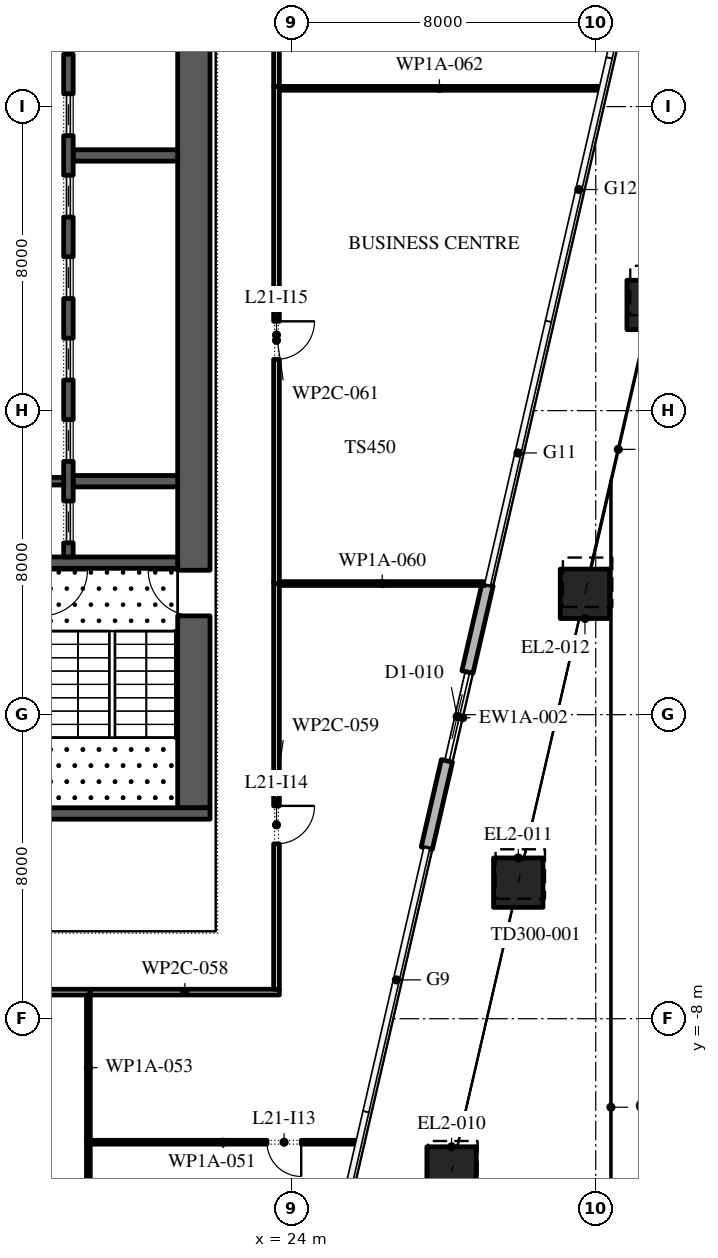
"""IFC4 building model, lengths in metres.
Left out: names, types, materials, properties, quantities, classifications, styles, units other than length and angle.
Written with IfcOpenShell. Run it as: python <this file> out.ifc"""

import sys

from ifc_helpers import new_model, si_unit, direction, frame, frame_2d, origin, origin_2d, place, context, subcontext, project, spatial, rectangle, extrude, element, fill, save


model = new_model("IFC4")
c1 = context("Model", 3, precision=1e-05, world=origin(), true_north=direction((0.0, 1.0)))
c2 = subcontext(c1, "Body", "Model", "MODEL_VIEW")
j1 = project(units=[si_unit("LENGTHUNIT", "METRE"), si_unit("PLANEANGLEUNIT", "RADIAN")], contexts=[c1])
p1 = place(None, origin())
s1 = spatial("IfcSite", under=j1, at=p1, CompositionType="ELEMENT")
p2 = place(p1, origin())
s2 = spatial("IfcBuilding", under=s1, at=p2, CompositionType="ELEMENT")
p3 = place(p2, frame((0.0, 0.0, 99.6)))
s3 = spatial("IfcBuildingStorey", under=s2, at=p3, CompositionType="ELEMENT", Elevation=99.6)
p4 = place(p3, frame((28.207, -12.02, 0.0), z_axis=(0.005857398783, 0.025300708632, 0.999662725634), x_axis=(-0.974232565058, 0.225545802843, 0.0)))
e1 = element("IfcColumn", 1, at=p4, inside=s3, PredefinedType="COLUMN", context=c2, shape_type="SweptSolid", body=[
    extrude(rectangle(XDim=1.3, YDim=1.3, at=origin_2d()), origin(), (0.0, 0.0, 1.0), 6.002),
])
p5 = place(p3, frame((29.961, -4.42, 0.0), z_axis=(0.008782396982, 0.037935075853, 0.999241612186), x_axis=(-0.974232565058, 0.225545802843, 0.0)))
e2 = element("IfcColumn", 2, at=p5, inside=s3, PredefinedType="COLUMN", context=c2, shape_type="SweptSolid", body=[
    extrude(rectangle(XDim=1.3, YDim=1.3, at=origin_2d()), origin(), (0.0, 0.0, 1.0), 6.005),
])
p6 = place(p3, frame((31.716, 3.18, 0.0), z_axis=(0.011662358406, 0.050509796164, 0.998655471065), x_axis=(-0.974364765994, 0.224974004698, 0.0)))
e3 = element("IfcColumn", 3, at=p6, inside=s3, PredefinedType="COLUMN", context=c2, shape_type="SweptSolid", body=[
    extrude(rectangle(XDim=1.3, YDim=1.3, at=origin_2d()), origin(), (0.0, 0.0, 1.0), 6.008),
])
p7 = place(p3, frame((33.471, 10.781, 0.0), z_axis=(0.014577044955, 0.063140125085, 0.997898208418), x_axis=(-0.974370069894, 0.224951032214, 0.0)))
e4 = element("IfcColumn", 4, at=p7, inside=s3, PredefinedType="COLUMN", context=c2, shape_type="SweptSolid", body=[
    extrude(rectangle(XDim=1.3, YDim=1.3, at=origin_2d()), origin(), (0.0, 0.0, 1.0), 6.013),
])
p8 = place(p3, frame((27.554, -3.512, 0.0), z_axis=(0.0, 0.0, 1.0), x_axis=(0.224949733175, 0.9743703698, 0.0)))
e5 = element("IfcWall", 5, at=p8, inside=s3, PredefinedType="STANDARD", context=c2, shape_type="SweptSolid", body=[
    extrude(rectangle(XDim=7.114, YDim=0.3, at=frame_2d((3.557, 0.0))), origin(), (0.0, 0.0, 1.0), 5.8),
])
p9 = place(p8, frame((2.357, 0.0, 0.0)))
e6 = element("IfcOpeningElement", 6, at=p9, cuts=e5, PredefinedType="OPENING", context=c2, shape_type="SweptSolid", body=[
    extrude(rectangle(XDim=2.4, YDim=3.5, at=frame_2d((1.2, 1.75))), frame((0.0, 0.16, 0.0), z_axis=(0.0, -1.0, 0.0), x_axis=(1.0, 0.0, 0.0)), (0.0, 0.0, 1.0), 0.32),
])
p10 = place(p3, frame((21.425, -2.45, 0.0), z_axis=(0.0, 0.0, 1.0), x_axis=(0.0, 1.0, 0.0)))
e7 = element("IfcWall", 7, at=p10, inside=s3, PredefinedType="SHEAR", context=c2, shape_type="SweptSolid", body=[
    extrude(rectangle(XDim=27.9, YDim=0.85, at=frame_2d((13.95, 0.0))), origin(), (0.0, 0.0, 1.0), 5.8),
])
p11 = place(p10, frame((5.05, 0.0, 0.0)))
e8 = element("IfcOpeningElement", 8, at=p11, cuts=e7, PredefinedType="OPENING", context=c2, shape_type="SweptSolid", body=[
    extrude(rectangle(XDim=1.2, YDim=2.1, at=frame_2d((0.6, 1.05))), frame((0.0, 0.435, 0.0), z_axis=(0.0, -1.0, 0.0), x_axis=(1.0, 0.0, 0.0)), (0.0, 0.0, 1.0), 0.87),
])
p12 = place(p10, frame((21.65, 0.0, 0.0)))
e9 = element("IfcOpeningElement", 9, at=p12, cuts=e7, PredefinedType="OPENING", context=c2, shape_type="SweptSolid", body=[
    extrude(rectangle(XDim=1.2, YDim=2.1, at=frame_2d((0.6, 1.05))), frame((0.0, 0.435, 0.0), z_axis=(0.0, -1.0, 0.0), x_axis=(1.0, 0.0, 0.0)), (0.0, 0.0, 1.0), 0.87),
])
p13 = place(p3, frame((10.15, -2.6, 0.0), z_axis=(0.0, 0.0, 1.0), x_axis=(1.0, 0.0, 0.0)))
e10 = element("IfcWall", 10, at=p13, inside=s3, PredefinedType="SHEAR", context=c2, shape_type="SweptSolid", body=[
    extrude(rectangle(XDim=11.7, YDim=0.3, at=frame_2d((5.85, 0.0))), origin(), (0.0, 0.0, 1.0), 5.8),
])
p14 = place(p3, frame((17.3, 4.0, 0.0), z_axis=(0.0, 0.0, 1.0), x_axis=(1.0, 0.0, 0.0)))
e11 = element("IfcWall", 11, at=p14, inside=s3, PredefinedType="SHEAR", context=c2, shape_type="SweptSolid", body=[
    extrude(rectangle(XDim=3.7, YDim=0.3, at=frame_2d((1.85, 0.0))), origin(), (0.0, 0.0, 1.0), 5.8),
])
for number, where, z_axis, x_axis in (
    (12, (18.25, 6.143, 0.0), (0.0, 0.0, 1.0), (1.0, 0.0, 0.0)),
    (13, (18.25, 14.714, 0.0), (0.0, 0.0, 1.0), (1.0, 0.0, 0.0)),
):
    element("IfcWall", number, at=place(p3, frame(where, z_axis=z_axis, x_axis=x_axis)), inside=s3, PredefinedType="SHEAR", context=c2, shape_type="SweptSolid", body=[
        extrude(rectangle(XDim=2.75, YDim=0.3, at=frame_2d((1.375, 0.0))), origin(), (0.0, 0.0, 1.0), 5.8),
    ])
p15 = place(p3, frame((18.125, 4.15, 0.0), z_axis=(0.0, 0.0, 1.0), x_axis=(0.0, 1.0, 0.0)))
e14 = element("IfcWall", 14, at=p15, inside=s3, PredefinedType="SHEAR", context=c2, shape_type="SweptSolid", body=[
    extrude(rectangle(XDim=14.7, YDim=0.25, at=frame_2d((7.35, 0.0))), origin(), (0.0, 0.0, 1.0), 5.8),
])
p16 = place(p15, frame((0.371, 0.0, 0.0)))
e15 = element("IfcOpeningElement", 15, at=p16, cuts=e14, PredefinedType="OPENING", context=c2, shape_type="SweptSolid", body=[
    extrude(rectangle(XDim=1.1, YDim=2.1, at=frame_2d((0.55, 1.05))), frame((0.0, 0.135, 0.0), z_axis=(0.0, -1.0, 0.0), x_axis=(1.0, 0.0, 0.0)), (0.0, 0.0, 1.0), 0.27),
])
p17 = place(p15, frame((2.514, 0.0, 0.0)))
e16 = element("IfcOpeningElement", 16, at=p17, cuts=e14, PredefinedType="OPENING", context=c2, shape_type="SweptSolid", body=[
    extrude(rectangle(XDim=1.1, YDim=2.1, at=frame_2d((0.55, 1.05))), frame((0.0, 0.135, 0.0), z_axis=(0.0, -1.0, 0.0), x_axis=(1.0, 0.0, 0.0)), (0.0, 0.0, 1.0), 0.27),
])
p18 = place(p15, frame((4.657, 0.0, 0.0)))
e17 = element("IfcOpeningElement", 17, at=p18, cuts=e14, PredefinedType="OPENING", context=c2, shape_type="SweptSolid", body=[
    extrude(rectangle(XDim=1.1, YDim=2.1, at=frame_2d((0.55, 1.05))), frame((0.0, 0.135, 0.0), z_axis=(0.0, -1.0, 0.0), x_axis=(1.0, 0.0, 0.0)), (0.0, 0.0, 1.0), 0.27),
])
p19 = place(p15, frame((6.8, 0.0, 0.0)))
e18 = element("IfcOpeningElement", 18, at=p19, cuts=e14, PredefinedType="OPENING", context=c2, shape_type="SweptSolid", body=[
    extrude(rectangle(XDim=1.1, YDim=2.1, at=frame_2d((0.55, 1.05))), frame((0.0, 0.135, 0.0), z_axis=(0.0, -1.0, 0.0), x_axis=(1.0, 0.0, 0.0)), (0.0, 0.0, 1.0), 0.27),
])
p20 = place(p15, frame((8.943, 0.0, 0.0)))
e19 = element("IfcOpeningElement", 19, at=p20, cuts=e14, PredefinedType="OPENING", context=c2, shape_type="SweptSolid", body=[
    extrude(rectangle(XDim=1.1, YDim=2.1, at=frame_2d((0.55, 1.05))), frame((0.0, 0.135, 0.0), z_axis=(0.0, -1.0, 0.0), x_axis=(1.0, 0.0, 0.0)), (0.0, 0.0, 1.0), 0.27),
])
p21 = place(p15, frame((11.086, 0.0, 0.0)))
e20 = element("IfcOpeningElement", 20, at=p21, cuts=e14, PredefinedType="OPENING", context=c2, shape_type="SweptSolid", body=[
    extrude(rectangle(XDim=1.1, YDim=2.1, at=frame_2d((0.55, 1.05))), frame((0.0, 0.135, 0.0), z_axis=(0.0, -1.0, 0.0), x_axis=(1.0, 0.0, 0.0)), (0.0, 0.0, 1.0), 0.27),
])
p22 = place(p15, frame((13.229, 0.0, 0.0)))
e21 = element("IfcOpeningElement", 21, at=p22, cuts=e14, PredefinedType="OPENING", context=c2, shape_type="SweptSolid", body=[
    extrude(rectangle(XDim=1.1, YDim=2.1, at=frame_2d((0.55, 1.05))), frame((0.0, 0.135, 0.0), z_axis=(0.0, -1.0, 0.0), x_axis=(1.0, 0.0, 0.0)), (0.0, 0.0, 1.0), 0.27),
])
p23 = place(p3, frame((14.0, 6.143, 0.0), z_axis=(0.0, 0.0, 1.0), x_axis=(1.0, 0.0, 0.0)))
e22 = element("IfcWall", 22, at=p23, inside=s3, PredefinedType="SHEAR", context=c2, shape_type="SweptSolid", body=[
    extrude(rectangle(XDim=4.0, YDim=0.2, at=frame_2d((2.0, 0.0))), origin(), (0.0, 0.0, 1.0), 5.8),
])
p24 = place(p23, frame((1.4, 0.0, 0.0)))
e23 = element("IfcOpeningElement", 23, at=p24, cuts=e22, PredefinedType="OPENING", context=c2, shape_type="SweptSolid", body=[
    extrude(rectangle(XDim=1.2, YDim=2.1, at=frame_2d((0.6, 1.05))), frame((0.0, 0.11, 0.0), z_axis=(0.0, -1.0, 0.0), x_axis=(1.0, 0.0, 0.0)), (0.0, 0.0, 1.0), 0.22),
])
p25 = place(p3, frame((18.65, -11.2, 0.0), z_axis=(0.0, 0.0, 1.0), x_axis=(0.0, -1.0, 0.0)))
e24 = element("IfcWall", 24, at=p25, inside=s3, PredefinedType="PARTITIONING", context=c2, shape_type="SweptSolid", body=[
    extrude(rectangle(XDim=5.25, YDim=0.1, at=frame_2d((2.625, 0.0))), origin(), (0.0, 0.0, 1.0), 5.8),
])
p26 = place(p3, frame((18.7, -11.25, 0.0), z_axis=(0.0, 0.0, 1.0), x_axis=(1.0, 0.0, 0.0)))
e25 = element("IfcWall", 25, at=p26, inside=s3, PredefinedType="PARTITIONING", context=c2, shape_type="SweptSolid", body=[
    extrude(rectangle(XDim=6.996, YDim=0.1, at=frame_2d((3.498, 0.0))), origin(), (0.0, 0.0, 1.0), 5.8),
])
p27 = place(p26, frame((4.65, 0.0, 0.0)))
e26 = element("IfcOpeningElement", 26, at=p27, cuts=e25, PredefinedType="OPENING", context=c2, shape_type="SweptSolid", body=[
    extrude(rectangle(XDim=0.9, YDim=2.1, at=frame_2d((0.45, 1.05))), frame((0.0, 0.06, 0.0), z_axis=(0.0, -1.0, 0.0), x_axis=(1.0, 0.0, 0.0)), (0.0, 0.0, 1.0), 0.12),
])
p28 = place(p3, frame((18.7, -7.3, 0.0), z_axis=(0.0, 0.0, 1.0), x_axis=(-1.0, 0.0, 0.0)))
e27 = element("IfcWall", 27, at=p28, inside=s3, PredefinedType="PARTITIONING", context=c2, shape_type="SweptSolid", body=[
    extrude(rectangle(XDim=8.38, YDim=0.15, at=frame_2d((4.19, 0.0))), origin(), (0.0, 0.0, 1.0), 5.8),
])
p29 = place(p28, frame((3.73, 0.0, 0.0)))
e28 = element("IfcOpeningElement", 28, at=p29, cuts=e27, PredefinedType="OPENING", context=c2, shape_type="SweptSolid", body=[
    extrude(rectangle(XDim=1.0, YDim=2.1, at=frame_2d((0.5, 1.05))), frame((0.0, 0.085, 0.0), z_axis=(0.0, -1.0, 0.0), x_axis=(1.0, 0.0, 0.0)), (0.0, 0.0, 1.0), 0.17),
])
p30 = place(p3, frame((18.65, -7.375, 0.0), z_axis=(0.0, 0.0, 1.0), x_axis=(0.0, -1.0, 0.0)))
e29 = element("IfcWall", 29, at=p30, inside=s3, PredefinedType="PARTITIONING", context=c2, shape_type="SweptSolid", body=[
    extrude(rectangle(XDim=3.825, YDim=0.1, at=frame_2d((1.913, 0.0))), origin(), (0.0, 0.0, 1.0), 5.8),
])
p31 = place(p3, frame((23.675, -7.3, 0.0), z_axis=(0.0, 0.0, 1.0), x_axis=(-1.0, 0.0, 0.0)))
e30 = element("IfcWall", 30, at=p31, inside=s3, PredefinedType="PARTITIONING", context=c2, shape_type="SweptSolid", body=[
    extrude(rectangle(XDim=4.975, YDim=0.15, at=frame_2d((2.488, 0.0))), origin(), (0.0, 0.0, 1.0), 5.8),
])
p32 = place(p3, frame((23.6, 3.5, 0.0), z_axis=(0.0, 0.0, 1.0), x_axis=(0.0, -1.0, 0.0)))
e31 = element("IfcWall", 31, at=p32, inside=s3, PredefinedType="PARTITIONING", context=c2, shape_type="SweptSolid", body=[
    extrude(rectangle(XDim=10.725, YDim=0.15, at=frame_2d((5.363, 0.0))), origin(), (0.0, 0.0, 1.0), 5.8),
])
p33 = place(p32, frame((5.9, 0.0, 0.0)))
e32 = element("IfcOpeningElement", 32, at=p33, cuts=e31, PredefinedType="OPENING", context=c2, shape_type="SweptSolid", body=[
    extrude(rectangle(XDim=1.0, YDim=2.1, at=frame_2d((0.5, 1.05))), frame((0.0, 0.085, 0.0), z_axis=(0.0, -1.0, 0.0), x_axis=(1.0, 0.0, 0.0)), (0.0, 0.0, 1.0), 0.17),
])
p34 = place(p3, frame((23.675, 3.45, 0.0), z_axis=(0.0, 0.0, 1.0), x_axis=(1.0, 0.0, 0.0)))
e33 = element("IfcWall", 33, at=p34, inside=s3, PredefinedType="PARTITIONING", context=c2, shape_type="SweptSolid", body=[
    extrude(rectangle(XDim=5.415, YDim=0.1, at=frame_2d((2.708, 0.0))), origin(), (0.0, 0.0, 1.0), 5.8),
])
p35 = place(p3, frame((23.6, 16.53, 0.0), z_axis=(0.0, 0.0, 1.0), x_axis=(0.0, -1.0, 0.0)))
e34 = element("IfcWall", 34, at=p35, inside=s3, PredefinedType="PARTITIONING", context=c2, shape_type="SweptSolid", body=[
    extrude(rectangle(XDim=13.08, YDim=0.15, at=frame_2d((6.54, 0.0))), origin(), (0.0, 0.0, 1.0), 5.8),
])
p36 = place(p35, frame((6.18, 0.0, 0.0)))
e35 = element("IfcOpeningElement", 35, at=p36, cuts=e34, PredefinedType="OPENING", context=c2, shape_type="SweptSolid", body=[
    extrude(rectangle(XDim=1.0, YDim=2.1, at=frame_2d((0.5, 1.05))), frame((0.0, 0.085, 0.0), z_axis=(0.0, -1.0, 0.0), x_axis=(1.0, 0.0, 0.0)), (0.0, 0.0, 1.0), 0.17),
])
p37 = place(p3, frame((23.675, 16.48, 0.0), z_axis=(0.0, 0.0, 1.0), x_axis=(1.0, 0.0, 0.0)))
e36 = element("IfcWall", 36, at=p37, inside=s3, PredefinedType="PARTITIONING", context=c2, shape_type="SweptSolid", body=[
    extrude(rectangle(XDim=8.423, YDim=0.1, at=frame_2d((4.211, 0.0))), origin(), (0.0, 0.0, 1.0), 5.8),
])
p38 = place(p3, frame((23.6, 23.46, 0.0), z_axis=(0.0, 0.0, 1.0), x_axis=(0.0, -1.0, 0.0)))
e37 = element("IfcWall", 37, at=p38, inside=s3, PredefinedType="PARTITIONING", context=c2, shape_type="SweptSolid", body=[
    extrude(rectangle(XDim=6.93, YDim=0.15, at=frame_2d((3.465, 0.0))), origin(), (0.0, 0.0, 1.0), 5.8),
])
p39 = place(p38, frame((4.33, 0.0, 0.0)))
e38 = element("IfcOpeningElement", 38, at=p39, cuts=e37, PredefinedType="OPENING", context=c2, shape_type="SweptSolid", body=[
    extrude(rectangle(XDim=1.0, YDim=2.1, at=frame_2d((0.5, 1.05))), frame((0.0, 0.085, 0.0), z_axis=(0.0, -1.0, 0.0), x_axis=(1.0, 0.0, 0.0)), (0.0, 0.0, 1.0), 0.17),
])
p40 = place(p9, origin())
e39 = element("IfcDoor", 39, at=p40, inside=s3, OperationType="DOUBLE_DOOR_SLIDING", PredefinedType="DOOR", context=c2, shape_type="SweptSolid", body=[
    extrude(rectangle(XDim=2.4, YDim=3.5, at=frame_2d((1.2, 1.75))), frame((0.0, 0.025, 0.0), z_axis=(0.0, -1.0, 0.0), x_axis=(1.0, 0.0, 0.0)), (0.0, 0.0, 1.0), 0.05),
])
fill(e6, e39)
p41 = place(p16, origin())
e40 = element("IfcDoor", 40, at=p41, inside=s3, OperationType="SLIDING_TO_LEFT", PredefinedType="DOOR", context=c2, shape_type="SweptSolid", body=[
    extrude(rectangle(XDim=1.1, YDim=2.1, at=frame_2d((0.55, 1.05))), frame((0.0, 0.025, 0.0), z_axis=(0.0, -1.0, 0.0), x_axis=(1.0, 0.0, 0.0)), (0.0, 0.0, 1.0), 0.05),
])
fill(e15, e40)
p42 = place(p17, origin())
e41 = element("IfcDoor", 41, at=p42, inside=s3, OperationType="SLIDING_TO_LEFT", PredefinedType="DOOR", context=c2, shape_type="SweptSolid", body=[
    extrude(rectangle(XDim=1.1, YDim=2.1, at=frame_2d((0.55, 1.05))), frame((0.0, 0.025, 0.0), z_axis=(0.0, -1.0, 0.0), x_axis=(1.0, 0.0, 0.0)), (0.0, 0.0, 1.0), 0.05),
])
fill(e16, e41)
p43 = place(p18, origin())
e42 = element("IfcDoor", 42, at=p43, inside=s3, OperationType="SLIDING_TO_LEFT", PredefinedType="DOOR", context=c2, shape_type="SweptSolid", body=[
    extrude(rectangle(XDim=1.1, YDim=2.1, at=frame_2d((0.55, 1.05))), frame((0.0, 0.025, 0.0), z_axis=(0.0, -1.0, 0.0), x_axis=(1.0, 0.0, 0.0)), (0.0, 0.0, 1.0), 0.05),
])
fill(e17, e42)
p44 = place(p19, origin())
e43 = element("IfcDoor", 43, at=p44, inside=s3, OperationType="SLIDING_TO_LEFT", PredefinedType="DOOR", context=c2, shape_type="SweptSolid", body=[
    extrude(rectangle(XDim=1.1, YDim=2.1, at=frame_2d((0.55, 1.05))), frame((0.0, 0.025, 0.0), z_axis=(0.0, -1.0, 0.0), x_axis=(1.0, 0.0, 0.0)), (0.0, 0.0, 1.0), 0.05),
])
fill(e18, e43)
p45 = place(p20, origin())
e44 = element("IfcDoor", 44, at=p45, inside=s3, OperationType="SLIDING_TO_LEFT", PredefinedType="DOOR", context=c2, shape_type="SweptSolid", body=[
    extrude(rectangle(XDim=1.1, YDim=2.1, at=frame_2d((0.55, 1.05))), frame((0.0, 0.025, 0.0), z_axis=(0.0, -1.0, 0.0), x_axis=(1.0, 0.0, 0.0)), (0.0, 0.0, 1.0), 0.05),
])
fill(e19, e44)
p46 = place(p21, origin())
e45 = element("IfcDoor", 45, at=p46, inside=s3, OperationType="SLIDING_TO_LEFT", PredefinedType="DOOR", context=c2, shape_type="SweptSolid", body=[
    extrude(rectangle(XDim=1.1, YDim=2.1, at=frame_2d((0.55, 1.05))), frame((0.0, 0.025, 0.0), z_axis=(0.0, -1.0, 0.0), x_axis=(1.0, 0.0, 0.0)), (0.0, 0.0, 1.0), 0.05),
])
fill(e20, e45)
p47 = place(p22, origin())
e46 = element("IfcDoor", 46, at=p47, inside=s3, OperationType="SLIDING_TO_LEFT", PredefinedType="DOOR", context=c2, shape_type="SweptSolid", body=[
    extrude(rectangle(XDim=1.1, YDim=2.1, at=frame_2d((0.55, 1.05))), frame((0.0, 0.025, 0.0), z_axis=(0.0, -1.0, 0.0), x_axis=(1.0, 0.0, 0.0)), (0.0, 0.0, 1.0), 0.05),
])
fill(e21, e46)
p48 = place(p11, origin())
e47 = element("IfcDoor", 47, at=p48, inside=s3, OperationType="SINGLE_SWING_LEFT", PredefinedType="DOOR", context=c2, shape_type="SweptSolid", body=[
    extrude(rectangle(XDim=1.2, YDim=2.1, at=frame_2d((0.6, 1.05))), frame((0.0, 0.025, 0.0), z_axis=(0.0, -1.0, 0.0), x_axis=(1.0, 0.0, 0.0)), (0.0, 0.0, 1.0), 0.05),
])
fill(e8, e47)
p49 = place(p27, frame((0.9, 0.0, 0.0), z_axis=(0.0, 0.0, 1.0), x_axis=(-1.0, 0.0, 0.0)))
e48 = element("IfcDoor", 48, at=p49, inside=s3, OperationType="SINGLE_SWING_RIGHT", PredefinedType="DOOR", context=c2, shape_type="SweptSolid", body=[
    extrude(rectangle(XDim=0.9, YDim=2.1, at=frame_2d((0.45, 1.05))), frame((0.0, 0.025, 0.0), z_axis=(0.0, -1.0, 0.0), x_axis=(1.0, 0.0, 0.0)), (0.0, 0.0, 1.0), 0.05),
])
fill(e26, e48)
p50 = place(p33, origin())
e49 = element("IfcDoor", 49, at=p50, inside=s3, OperationType="SINGLE_SWING_RIGHT", PredefinedType="DOOR", context=c2, shape_type="SweptSolid", body=[
    extrude(rectangle(XDim=1.0, YDim=2.1, at=frame_2d((0.5, 1.05))), frame((0.0, 0.025, 0.0), z_axis=(0.0, -1.0, 0.0), x_axis=(1.0, 0.0, 0.0)), (0.0, 0.0, 1.0), 0.05),
])
fill(e32, e49)
p51 = place(p36, origin())
e50 = element("IfcDoor", 50, at=p51, inside=s3, OperationType="SINGLE_SWING_RIGHT", PredefinedType="DOOR", context=c2, shape_type="SweptSolid", body=[
    extrude(rectangle(XDim=1.0, YDim=2.1, at=frame_2d((0.5, 1.05))), frame((0.0, 0.025, 0.0), z_axis=(0.0, -1.0, 0.0), x_axis=(1.0, 0.0, 0.0)), (0.0, 0.0, 1.0), 0.05),
])
fill(e35, e50)
save(model, sys.argv[1])
